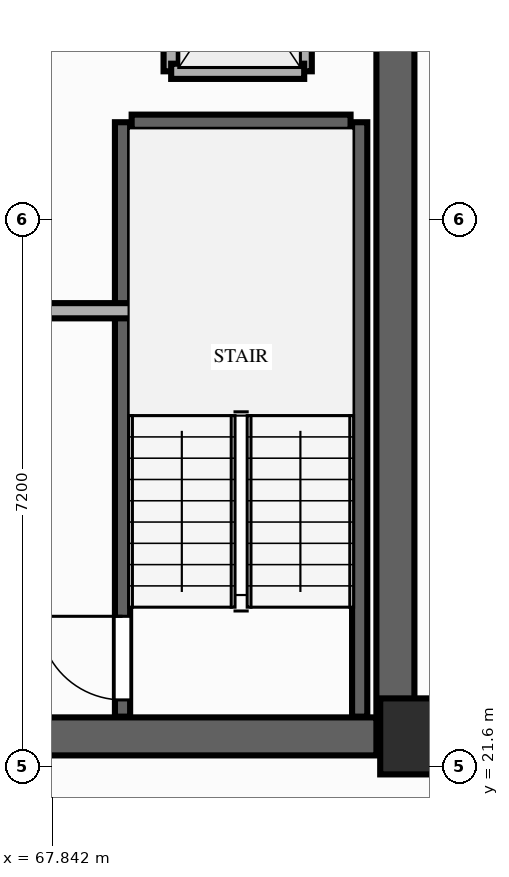
"""IFC4 building model, lengths in metres.
Left out: names, types, materials, properties, quantities, classifications, styles, units other than length and angle.
Written with IfcOpenShell. Run it as: python <this file> out.ifc"""

import sys

from ifc_helpers import new_model, si_unit, direction, frame, frame_2d, origin, origin_2d, place, context, subcontext, project, spatial, rectangle, extrude, element, fill, save


model = new_model("IFC4")
c1 = context("Model", 3, precision=1e-05, world=origin(), true_north=direction((0.0, 1.0)))
c2 = subcontext(c1, "Body", "Model", "MODEL_VIEW")
j1 = project(units=[si_unit("LENGTHUNIT", "METRE"), si_unit("PLANEANGLEUNIT", "RADIAN")], contexts=[c1])
p1 = place(None, origin())
s1 = spatial("IfcSite", under=j1, at=p1, CompositionType="ELEMENT")
p2 = place(p1, origin())
s2 = spatial("IfcBuilding", under=s1, at=p2, CompositionType="ELEMENT")
p3 = place(p2, frame((0.0, 0.0, 66.0)))
s3 = spatial("IfcBuildingStorey", under=s2, at=p3, CompositionType="ELEMENT", Elevation=66.0)
p4 = place(p3, frame((72.65, 22.0, 0.0), z_axis=(0.0, 0.0, 1.0), x_axis=(1.0, 0.0, 0.0)))
e1 = element("IfcColumn", 1, at=p4, inside=s3, PredefinedType="COLUMN", context=c2, shape_type="SweptSolid", body=[
    extrude(rectangle(XDim=1.0, YDim=1.0, at=origin_2d()), origin(), (0.0, 0.0, 1.0), 3.2),
])
p5 = place(p3, frame((72.35, 22.0, 0.0), z_axis=(0.0, 0.0, 1.0), x_axis=(0.0, 1.0, 0.0)))
e2 = element("IfcWall", 2, at=p5, inside=s3, PredefinedType="SHEAR", context=c2, shape_type="SweptSolid", body=[
    extrude(rectangle(XDim=20.25, YDim=0.5, at=frame_2d((10.125, 0.0))), origin(), (0.0, 0.0, 1.0), 3.02),
])
p6 = place(p3, frame((64.6, 22.0, 0.0), z_axis=(0.0, 0.0, 1.0), x_axis=(1.0, 0.0, 0.0)))
e3 = element("IfcWall", 3, at=p6, inside=s3, PredefinedType="SHEAR", context=c2, shape_type="SweptSolid", body=[
    extrude(rectangle(XDim=7.5, YDim=0.5, at=frame_2d((3.75, 0.0))), origin(), (0.0, 0.0, 1.0), 3.02),
])
p7 = place(p3, frame((68.76, 22.26, 0.0), z_axis=(0.0, 0.0, 1.0), x_axis=(0.0, 1.0, 0.0)))
e4 = element("IfcWall", 4, at=p7, inside=s3, PredefinedType="SHEAR", context=c2, shape_type="SweptSolid", body=[
    extrude(rectangle(XDim=7.82, YDim=0.2, at=frame_2d((3.91, 0.0))), origin(), (0.0, 0.0, 1.0), 3.02),
])
p8 = place(p7, frame((0.22, 0.0, 0.0)))
e5 = element("IfcOpeningElement", 5, at=p8, cuts=e4, PredefinedType="OPENING", context=c2, shape_type="SweptSolid", body=[
    extrude(rectangle(XDim=1.1, YDim=2.15, at=frame_2d((0.55, 1.075))), frame((0.0, 0.11, 0.0), z_axis=(0.0, -1.0, 0.0), x_axis=(1.0, 0.0, 0.0)), (0.0, 0.0, 1.0), 0.22),
])
p9 = place(p3, frame((71.88, 22.26, 0.0), z_axis=(0.0, 0.0, 1.0), x_axis=(0.0, 1.0, 0.0)))
e6 = element("IfcWall", 6, at=p9, inside=s3, PredefinedType="SHEAR", context=c2, shape_type="SweptSolid", body=[
    extrude(rectangle(XDim=7.82, YDim=0.2, at=frame_2d((3.91, 0.0))), origin(), (0.0, 0.0, 1.0), 3.02),
])
p10 = place(p3, frame((68.88, 30.08, 0.0), z_axis=(0.0, 0.0, 1.0), x_axis=(1.0, 0.0, 0.0)))
e7 = element("IfcWall", 7, at=p10, inside=s3, PredefinedType="SHEAR", context=c2, shape_type="SweptSolid", body=[
    extrude(rectangle(XDim=2.88, YDim=0.2, at=frame_2d((1.44, 0.0))), origin(), (0.0, 0.0, 1.0), 3.02),
])
p11 = place(p3, frame((69.4, 30.75, 0.0), z_axis=(0.0, 0.0, 1.0), x_axis=(0.0, 1.0, 0.0)))
e8 = element("IfcWall", 8, at=p11, inside=s3, PredefinedType="MOVABLE", context=c2, shape_type="SweptSolid", body=[
    extrude(rectangle(XDim=2.45, YDim=0.2, at=frame_2d((1.225, 0.0))), origin(), (0.0, 0.0, 1.0), 3.02),
])
p12 = place(p11, frame((0.65, 0.0, 0.0)))
e9 = element("IfcOpeningElement", 9, at=p12, cuts=e8, PredefinedType="OPENING", context=c2, shape_type="SweptSolid", body=[
    extrude(rectangle(XDim=1.05, YDim=2.15, at=frame_2d((0.525, 1.075))), frame((0.0, 0.11, 0.0), z_axis=(0.0, -1.0, 0.0), x_axis=(1.0, 0.0, 0.0)), (0.0, 0.0, 1.0), 0.22),
])
p13 = place(p3, frame((71.15, 30.75, 0.0), z_axis=(0.0, 0.0, 1.0), x_axis=(0.0, 1.0, 0.0)))
e10 = element("IfcWall", 10, at=p13, inside=s3, PredefinedType="MOVABLE", context=c2, shape_type="SweptSolid", body=[
    extrude(rectangle(XDim=2.45, YDim=0.2, at=frame_2d((1.225, 0.0))), origin(), (0.0, 0.0, 1.0), 3.02),
])
p14 = place(p3, frame((69.4, 30.75, 0.0), z_axis=(0.0, 0.0, 1.0), x_axis=(1.0, 0.0, 0.0)))
e11 = element("IfcWall", 11, at=p14, inside=s3, PredefinedType="MOVABLE", context=c2, shape_type="SweptSolid", body=[
    extrude(rectangle(XDim=1.75, YDim=0.2, at=frame_2d((0.875, 0.0))), origin(), (0.0, 0.0, 1.0), 3.02),
])
p15 = place(p3, frame((65.8, 27.6, 0.0), z_axis=(0.0, 0.0, 1.0), x_axis=(1.0, 0.0, 0.0)))
e12 = element("IfcWall", 12, at=p15, inside=s3, PredefinedType="PARTITIONING", context=c2, shape_type="SweptSolid", body=[
    extrude(rectangle(XDim=3.4, YDim=0.2, at=frame_2d((1.7, 0.0))), origin(), (0.0, 0.0, 1.0), 3.02),
])
p16 = place(p8, origin())
e13 = element("IfcDoor", 13, at=p16, inside=s3, OperationType="SINGLE_SWING_RIGHT", PredefinedType="DOOR", context=c2, shape_type="SweptSolid", body=[
    extrude(rectangle(XDim=1.1, YDim=2.15, at=frame_2d((0.55, 1.075))), frame((0.0, 0.025, 0.0), z_axis=(0.0, -1.0, 0.0), x_axis=(1.0, 0.0, 0.0)), (0.0, 0.0, 1.0), 0.05),
])
fill(e5, e13)
save(model, sys.argv[1])
